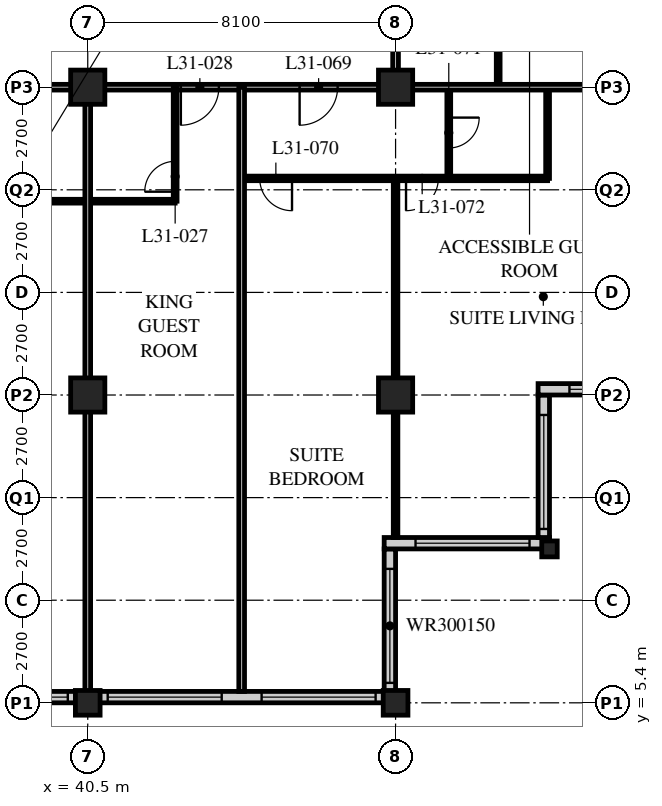
"""IFC4 building model, lengths in metres.
Left out: names, types, materials, properties, quantities, classifications, styles, units other than length and angle.
Written with IfcOpenShell. Run it as: python <this file> out.ifc"""

import sys

from ifc_helpers import new_model, si_unit, direction, frame, frame_2d, origin, origin_2d, place, context, subcontext, project, spatial, rectangle, hollow_rectangle, i_section, extrude, element, fill, save


model = new_model("IFC4")
c1 = context("Model", 3, precision=1e-05, world=origin(), true_north=direction((0.0, 1.0)))
c2 = subcontext(c1, "Body", "Model", "MODEL_VIEW")
j1 = project(units=[si_unit("LENGTHUNIT", "METRE"), si_unit("PLANEANGLEUNIT", "RADIAN")], contexts=[c1])
p1 = place(None, origin())
s1 = spatial("IfcSite", under=j1, at=p1, CompositionType="ELEMENT")
p2 = place(p1, origin())
s2 = spatial("IfcBuilding", under=s1, at=p2, CompositionType="ELEMENT")
p3 = place(p2, frame((0.0, 0.0, 123.8)))
s3 = spatial("IfcBuildingStorey", under=s2, at=p3, CompositionType="ELEMENT", Elevation=123.8)
p4 = place(p3, frame((40.5, 5.4, 0.0), z_axis=(0.0, 0.0, 1.0), x_axis=(1.0, 0.0, 0.0)))
e1 = element("IfcColumn", 1, at=p4, inside=s3, PredefinedType="COLUMN", context=c2, shape_type="SweptSolid", body=[
    extrude(hollow_rectangle(XDim=0.65, YDim=0.65, WallThickness=0.055, at=origin_2d()), origin(), (0.0, 0.0, 1.0), 3.4),
])
for number, where, z_axis, x_axis in (
    (2, (40.5, 13.5, 0.0), (0.0, 0.0, 1.0), (1.0, 0.0, 0.0)),
    (3, (40.5, 21.6, 0.0), (0.0, 0.0, 1.0), (1.0, 0.0, 0.0)),
):
    element("IfcColumn", number, at=place(p3, frame(where, z_axis=z_axis, x_axis=x_axis)), inside=s3, PredefinedType="COLUMN", context=c2, shape_type="SweptSolid", body=[
        extrude(hollow_rectangle(XDim=0.9, YDim=0.9, WallThickness=0.09, at=origin_2d()), origin(), (0.0, 0.0, 1.0), 3.4),
    ])
p5 = place(p3, frame((48.6, 5.4, 0.0), z_axis=(0.0, 0.0, 1.0), x_axis=(1.0, 0.0, 0.0)))
e4 = element("IfcColumn", 4, at=p5, inside=s3, PredefinedType="COLUMN", context=c2, shape_type="SweptSolid", body=[
    extrude(hollow_rectangle(XDim=0.65, YDim=0.65, WallThickness=0.055, at=origin_2d()), origin(), (0.0, 0.0, 1.0), 3.4),
])
for number, where, z_axis, x_axis in (
    (5, (48.6, 13.5, 0.0), (0.0, 0.0, 1.0), (1.0, 0.0, 0.0)),
    (6, (48.6, 21.6, 0.0), (0.0, 0.0, 1.0), (1.0, 0.0, 0.0)),
):
    element("IfcColumn", number, at=place(p3, frame(where, z_axis=z_axis, x_axis=x_axis)), inside=s3, PredefinedType="COLUMN", context=c2, shape_type="SweptSolid", body=[
        extrude(hollow_rectangle(XDim=0.9, YDim=0.9, WallThickness=0.09, at=origin_2d()), origin(), (0.0, 0.0, 1.0), 3.4),
    ])
p6 = place(p3, frame((52.65, 9.45, 0.0), z_axis=(0.0, 0.0, 1.0), x_axis=(1.0, 0.0, 0.0)))
e7 = element("IfcColumn", 7, at=p6, inside=s3, PredefinedType="COLUMN", context=c2, shape_type="SweptSolid", body=[
    extrude(i_section(OverallWidth=0.407, OverallDepth=0.419, WebThickness=0.031, FlangeThickness=0.049, FilletRadius=0.015, at=origin_2d()), origin(), (0.0, 0.0, 1.0), 3.4),
])
p7 = place(p3, frame((8.4, 5.55, 0.0), z_axis=(0.0, 0.0, 1.0), x_axis=(1.0, 0.0, 0.0)))
e8 = element("IfcWall", 8, at=p7, inside=s3, PredefinedType="SOLIDWALL", context=c2, shape_type="SweptSolid", body=[
    extrude(rectangle(XDim=40.2, YDim=0.3, at=frame_2d((20.1, 0.0))), origin(), (0.0, 0.0, 1.0), 3.19),
])
p8 = place(p7, frame((0.225, 0.0, 0.9)))
e9 = element("IfcOpeningElement", 9, at=p8, cuts=e8, PredefinedType="OPENING", context=c2, shape_type="SweptSolid", body=[
    extrude(rectangle(XDim=3.0, YDim=2.0, at=frame_2d((1.5, 1.0))), frame((0.0, 0.16, 0.0), z_axis=(0.0, -1.0, 0.0), x_axis=(1.0, 0.0, 0.0)), (0.0, 0.0, 1.0), 0.32),
])
p9 = place(p7, frame((4.275, 0.0, 0.9)))
e10 = element("IfcOpeningElement", 10, at=p9, cuts=e8, PredefinedType="OPENING", context=c2, shape_type="SweptSolid", body=[
    extrude(rectangle(XDim=3.0, YDim=2.0, at=frame_2d((1.5, 1.0))), frame((0.0, 0.16, 0.0), z_axis=(0.0, -1.0, 0.0), x_axis=(1.0, 0.0, 0.0)), (0.0, 0.0, 1.0), 0.32),
])
p10 = place(p7, frame((8.325, 0.0, 0.9)))
e11 = element("IfcOpeningElement", 11, at=p10, cuts=e8, PredefinedType="OPENING", context=c2, shape_type="SweptSolid", body=[
    extrude(rectangle(XDim=3.0, YDim=2.0, at=frame_2d((1.5, 1.0))), frame((0.0, 0.16, 0.0), z_axis=(0.0, -1.0, 0.0), x_axis=(1.0, 0.0, 0.0)), (0.0, 0.0, 1.0), 0.32),
])
p11 = place(p7, frame((12.375, 0.0, 0.9)))
e12 = element("IfcOpeningElement", 12, at=p11, cuts=e8, PredefinedType="OPENING", context=c2, shape_type="SweptSolid", body=[
    extrude(rectangle(XDim=3.0, YDim=2.0, at=frame_2d((1.5, 1.0))), frame((0.0, 0.16, 0.0), z_axis=(0.0, -1.0, 0.0), x_axis=(1.0, 0.0, 0.0)), (0.0, 0.0, 1.0), 0.32),
])
p12 = place(p7, frame((16.425, 0.0, 0.9)))
e13 = element("IfcOpeningElement", 13, at=p12, cuts=e8, PredefinedType="OPENING", context=c2, shape_type="SweptSolid", body=[
    extrude(rectangle(XDim=3.0, YDim=2.0, at=frame_2d((1.5, 1.0))), frame((0.0, 0.16, 0.0), z_axis=(0.0, -1.0, 0.0), x_axis=(1.0, 0.0, 0.0)), (0.0, 0.0, 1.0), 0.32),
])
p13 = place(p7, frame((20.475, 0.0, 0.9)))
e14 = element("IfcOpeningElement", 14, at=p13, cuts=e8, PredefinedType="OPENING", context=c2, shape_type="SweptSolid", body=[
    extrude(rectangle(XDim=3.0, YDim=2.0, at=frame_2d((1.5, 1.0))), frame((0.0, 0.16, 0.0), z_axis=(0.0, -1.0, 0.0), x_axis=(1.0, 0.0, 0.0)), (0.0, 0.0, 1.0), 0.32),
])
p14 = place(p7, frame((24.525, 0.0, 0.9)))
e15 = element("IfcOpeningElement", 15, at=p14, cuts=e8, PredefinedType="OPENING", context=c2, shape_type="SweptSolid", body=[
    extrude(rectangle(XDim=3.0, YDim=2.0, at=frame_2d((1.5, 1.0))), frame((0.0, 0.16, 0.0), z_axis=(0.0, -1.0, 0.0), x_axis=(1.0, 0.0, 0.0)), (0.0, 0.0, 1.0), 0.32),
])
p15 = place(p7, frame((28.575, 0.0, 0.9)))
e16 = element("IfcOpeningElement", 16, at=p15, cuts=e8, PredefinedType="OPENING", context=c2, shape_type="SweptSolid", body=[
    extrude(rectangle(XDim=3.0, YDim=2.0, at=frame_2d((1.5, 1.0))), frame((0.0, 0.16, 0.0), z_axis=(0.0, -1.0, 0.0), x_axis=(1.0, 0.0, 0.0)), (0.0, 0.0, 1.0), 0.32),
])
p16 = place(p7, frame((32.625, 0.0, 0.9)))
e17 = element("IfcOpeningElement", 17, at=p16, cuts=e8, PredefinedType="OPENING", context=c2, shape_type="SweptSolid", body=[
    extrude(rectangle(XDim=3.0, YDim=2.0, at=frame_2d((1.5, 1.0))), frame((0.0, 0.16, 0.0), z_axis=(0.0, -1.0, 0.0), x_axis=(1.0, 0.0, 0.0)), (0.0, 0.0, 1.0), 0.32),
])
p17 = place(p7, frame((36.675, 0.0, 0.9)))
e18 = element("IfcOpeningElement", 18, at=p17, cuts=e8, PredefinedType="OPENING", context=c2, shape_type="SweptSolid", body=[
    extrude(rectangle(XDim=3.0, YDim=2.0, at=frame_2d((1.5, 1.0))), frame((0.0, 0.16, 0.0), z_axis=(0.0, -1.0, 0.0), x_axis=(1.0, 0.0, 0.0)), (0.0, 0.0, 1.0), 0.32),
])
p18 = place(p3, frame((48.45, 5.7, 0.0), z_axis=(0.0, 0.0, 1.0), x_axis=(0.0, 1.0, 0.0)))
e19 = element("IfcWall", 19, at=p18, inside=s3, PredefinedType="SOLIDWALL", context=c2, shape_type="SweptSolid", body=[
    extrude(rectangle(XDim=3.75, YDim=0.3, at=frame_2d((1.875, 0.0))), origin(), (0.0, 0.0, 1.0), 3.19),
])
p19 = place(p18, frame((0.225, 0.0, 0.9)))
e20 = element("IfcOpeningElement", 20, at=p19, cuts=e19, PredefinedType="OPENING", context=c2, shape_type="SweptSolid", body=[
    extrude(rectangle(XDim=3.0, YDim=1.5, at=frame_2d((1.5, 0.75))), frame((0.0, 0.16, 0.0), z_axis=(0.0, -1.0, 0.0), x_axis=(1.0, 0.0, 0.0)), (0.0, 0.0, 1.0), 0.32),
])
p20 = place(p3, frame((48.3, 9.6, 0.0), z_axis=(0.0, 0.0, 1.0), x_axis=(1.0, 0.0, 0.0)))
e21 = element("IfcWall", 21, at=p20, inside=s3, PredefinedType="SOLIDWALL", context=c2, shape_type="SweptSolid", body=[
    extrude(rectangle(XDim=4.35, YDim=0.3, at=frame_2d((2.175, 0.0))), origin(), (0.0, 0.0, 1.0), 3.19),
])
p21 = place(p20, frame((0.825, 0.0, 0.9)))
e22 = element("IfcOpeningElement", 22, at=p21, cuts=e21, PredefinedType="OPENING", context=c2, shape_type="SweptSolid", body=[
    extrude(rectangle(XDim=3.0, YDim=1.5, at=frame_2d((1.5, 0.75))), frame((0.0, 0.16, 0.0), z_axis=(0.0, -1.0, 0.0), x_axis=(1.0, 0.0, 0.0)), (0.0, 0.0, 1.0), 0.32),
])
p22 = place(p3, frame((52.5, 9.75, 0.0), z_axis=(0.0, 0.0, 1.0), x_axis=(0.0, 1.0, 0.0)))
e23 = element("IfcWall", 23, at=p22, inside=s3, PredefinedType="SOLIDWALL", context=c2, shape_type="SweptSolid", body=[
    extrude(rectangle(XDim=3.75, YDim=0.3, at=frame_2d((1.875, 0.0))), origin(), (0.0, 0.0, 1.0), 3.19),
])
p23 = place(p22, frame((0.225, 0.0, 0.9)))
e24 = element("IfcOpeningElement", 24, at=p23, cuts=e23, PredefinedType="OPENING", context=c2, shape_type="SweptSolid", body=[
    extrude(rectangle(XDim=3.0, YDim=1.5, at=frame_2d((1.5, 0.75))), frame((0.0, 0.16, 0.0), z_axis=(0.0, -1.0, 0.0), x_axis=(1.0, 0.0, 0.0)), (0.0, 0.0, 1.0), 0.32),
])
p24 = place(p3, frame((52.35, 13.65, 0.0), z_axis=(0.0, 0.0, 1.0), x_axis=(1.0, 0.0, 0.0)))
e25 = element("IfcWall", 25, at=p24, inside=s3, PredefinedType="SOLIDWALL", context=c2, shape_type="SweptSolid", body=[
    extrude(rectangle(XDim=4.35, YDim=0.3, at=frame_2d((2.175, 0.0))), origin(), (0.0, 0.0, 1.0), 3.19),
])
p25 = place(p24, frame((0.825, 0.0, 0.9)))
e26 = element("IfcOpeningElement", 26, at=p25, cuts=e25, PredefinedType="OPENING", context=c2, shape_type="SweptSolid", body=[
    extrude(rectangle(XDim=3.0, YDim=1.5, at=frame_2d((1.5, 0.75))), frame((0.0, 0.16, 0.0), z_axis=(0.0, -1.0, 0.0), x_axis=(1.0, 0.0, 0.0)), (0.0, 0.0, 1.0), 0.32),
])
p26 = place(p3, frame((8.1, 21.6, 0.0), z_axis=(0.0, 0.0, 1.0), x_axis=(1.0, 0.0, 0.0)))
e27 = element("IfcWall", 27, at=p26, inside=s3, PredefinedType="PARTITIONING", context=c2, shape_type="SweptSolid", body=[
    extrude(rectangle(XDim=40.5, YDim=0.15, at=frame_2d((20.25, 0.0))), origin(), (0.0, 0.0, 1.0), 2.578),
])
p27 = place(p26, frame((9.625, 0.0, 0.0)))
e28 = element("IfcOpeningElement", 28, at=p27, cuts=e27, PredefinedType="OPENING", context=c2, shape_type="SweptSolid", body=[
    extrude(rectangle(XDim=1.0, YDim=2.1, at=frame_2d((0.5, 1.05))), frame((0.0, 0.085, 0.0), z_axis=(0.0, -1.0, 0.0), x_axis=(1.0, 0.0, 0.0)), (0.0, 0.0, 1.0), 0.17),
])
p28 = place(p26, frame((21.775, 0.0, 0.0)))
e29 = element("IfcOpeningElement", 29, at=p28, cuts=e27, PredefinedType="OPENING", context=c2, shape_type="SweptSolid", body=[
    extrude(rectangle(XDim=1.0, YDim=2.1, at=frame_2d((0.5, 1.05))), frame((0.0, 0.085, 0.0), z_axis=(0.0, -1.0, 0.0), x_axis=(1.0, 0.0, 0.0)), (0.0, 0.0, 1.0), 0.17),
])
p29 = place(p26, frame((28.95, 0.0, 0.0)))
e30 = element("IfcOpeningElement", 30, at=p29, cuts=e27, PredefinedType="OPENING", context=c2, shape_type="SweptSolid", body=[
    extrude(rectangle(XDim=1.0, YDim=2.1, at=frame_2d((0.5, 1.05))), frame((0.0, 0.085, 0.0), z_axis=(0.0, -1.0, 0.0), x_axis=(1.0, 0.0, 0.0)), (0.0, 0.0, 1.0), 0.17),
])
p30 = place(p26, frame((34.85, 0.0, 0.0)))
e31 = element("IfcOpeningElement", 31, at=p30, cuts=e27, PredefinedType="OPENING", context=c2, shape_type="SweptSolid", body=[
    extrude(rectangle(XDim=1.0, YDim=2.1, at=frame_2d((0.5, 1.05))), frame((0.0, 0.085, 0.0), z_axis=(0.0, -1.0, 0.0), x_axis=(1.0, 0.0, 0.0)), (0.0, 0.0, 1.0), 0.17),
])
p31 = place(p26, frame((1.525, 0.0, 0.0)))
e32 = element("IfcOpeningElement", 32, at=p31, cuts=e27, PredefinedType="OPENING", context=c2, shape_type="SweptSolid", body=[
    extrude(rectangle(XDim=1.0, YDim=2.1, at=frame_2d((0.5, 1.05))), frame((0.0, 0.085, 0.0), z_axis=(0.0, -1.0, 0.0), x_axis=(1.0, 0.0, 0.0)), (0.0, 0.0, 1.0), 0.17),
])
p32 = place(p26, frame((37.975, 0.0, 0.0)))
e33 = element("IfcOpeningElement", 33, at=p32, cuts=e27, PredefinedType="OPENING", context=c2, shape_type="SweptSolid", body=[
    extrude(rectangle(XDim=1.0, YDim=2.1, at=frame_2d((0.5, 1.05))), frame((0.0, 0.085, 0.0), z_axis=(0.0, -1.0, 0.0), x_axis=(1.0, 0.0, 0.0)), (0.0, 0.0, 1.0), 0.17),
])
p33 = place(p3, frame((48.6, 21.6, 0.0), z_axis=(0.0, 0.0, 1.0), x_axis=(0.0, 1.0, 0.0)))
e34 = element("IfcWall", 34, at=p33, inside=s3, PredefinedType="PARTITIONING", context=c2, shape_type="SweptSolid", body=[
    extrude(rectangle(XDim=24.3, YDim=0.15, at=frame_2d((12.15, 0.0))), origin(), (0.0, 0.0, 1.0), 2.578),
])
p34 = place(p33, frame((2.75, 0.0, 0.0)))
e35 = element("IfcOpeningElement", 35, at=p34, cuts=e34, PredefinedType="OPENING", context=c2, shape_type="SweptSolid", body=[
    extrude(rectangle(XDim=1.0, YDim=2.1, at=frame_2d((0.5, 1.05))), frame((0.0, 0.085, 0.0), z_axis=(0.0, -1.0, 0.0), x_axis=(1.0, 0.0, 0.0)), (0.0, 0.0, 1.0), 0.17),
])
p35 = place(p33, frame((4.65, 0.0, 0.0)))
e36 = element("IfcOpeningElement", 36, at=p35, cuts=e34, PredefinedType="OPENING", context=c2, shape_type="SweptSolid", body=[
    extrude(rectangle(XDim=1.0, YDim=2.1, at=frame_2d((0.5, 1.05))), frame((0.0, 0.085, 0.0), z_axis=(0.0, -1.0, 0.0), x_axis=(1.0, 0.0, 0.0)), (0.0, 0.0, 1.0), 0.17),
])
p36 = place(p33, frame((10.0, 0.0, 0.0)))
e37 = element("IfcOpeningElement", 37, at=p36, cuts=e34, PredefinedType="OPENING", context=c2, shape_type="SweptSolid", body=[
    extrude(rectangle(XDim=1.0, YDim=2.1, at=frame_2d((0.5, 1.05))), frame((0.0, 0.085, 0.0), z_axis=(0.0, -1.0, 0.0), x_axis=(1.0, 0.0, 0.0)), (0.0, 0.0, 1.0), 0.17),
])
p37 = place(p33, frame((18.1, 0.0, 0.0)))
e38 = element("IfcOpeningElement", 38, at=p37, cuts=e34, PredefinedType="OPENING", context=c2, shape_type="SweptSolid", body=[
    extrude(rectangle(XDim=1.0, YDim=2.1, at=frame_2d((0.5, 1.05))), frame((0.0, 0.085, 0.0), z_axis=(0.0, -1.0, 0.0), x_axis=(1.0, 0.0, 0.0)), (0.0, 0.0, 1.0), 0.17),
])
p38 = place(p3, frame((38.2, 18.6, 0.0), z_axis=(0.0, 0.0, 1.0), x_axis=(1.0, 0.0, 0.0)))
e39 = element("IfcWall", 39, at=p38, inside=s3, PredefinedType="PARTITIONING", context=c2, shape_type="SweptSolid", body=[
    extrude(rectangle(XDim=4.6, YDim=0.1, at=frame_2d((2.3, 0.0))), origin(), (0.0, 0.0, 1.0), 3.19),
])
p39 = place(p3, frame((40.5, 21.6, 0.0), z_axis=(0.0, 0.0, 1.0), x_axis=(0.0, -1.0, 0.0)))
e40 = element("IfcWall", 40, at=p39, inside=s3, PredefinedType="PARTITIONING", context=c2, shape_type="SweptSolid", body=[
    extrude(rectangle(XDim=15.9, YDim=0.15, at=frame_2d((7.95, 0.0))), origin(), (0.0, 0.0, 1.0), 2.578),
])
p40 = place(p3, frame((42.8, 21.6, 0.0), z_axis=(0.0, 0.0, 1.0), x_axis=(0.0, -1.0, 0.0)))
e41 = element("IfcWall", 41, at=p40, inside=s3, PredefinedType="PARTITIONING", context=c2, shape_type="SweptSolid", body=[
    extrude(rectangle(XDim=3.0, YDim=0.1, at=frame_2d((1.5, 0.0))), origin(), (0.0, 0.0, 1.0), 3.19),
])
p41 = place(p40, frame((1.95, 0.0, 0.0)))
e42 = element("IfcOpeningElement", 42, at=p41, cuts=e41, PredefinedType="OPENING", context=c2, shape_type="SweptSolid", body=[
    extrude(rectangle(XDim=0.8, YDim=2.1, at=frame_2d((0.4, 1.05))), frame((0.0, 0.06, 0.0), z_axis=(0.0, -1.0, 0.0), x_axis=(1.0, 0.0, 0.0)), (0.0, 0.0, 1.0), 0.12),
])
p42 = place(p3, frame((51.3, 21.6, 0.0), z_axis=(0.0, 0.0, 1.0), x_axis=(0.0, 1.0, 0.0)))
e43 = element("IfcWall", 43, at=p42, inside=s3, PredefinedType="PARTITIONING", context=c2, shape_type="SweptSolid", body=[
    extrude(rectangle(XDim=2.6, YDim=0.1, at=frame_2d((1.3, 0.0))), origin(), (0.0, 0.0, 1.0), 3.19),
])
p43 = place(p3, frame((44.55, 19.2, 0.0), z_axis=(0.0, 0.0, 1.0), x_axis=(1.0, 0.0, 0.0)))
e44 = element("IfcWall", 44, at=p43, inside=s3, PredefinedType="PARTITIONING", context=c2, shape_type="SweptSolid", body=[
    extrude(rectangle(XDim=8.05, YDim=0.12, at=frame_2d((4.025, 0.0))), origin(), (0.0, 0.0, 1.0), 3.19),
])
p44 = place(p43, frame((0.475, 0.0, 0.0)))
e45 = element("IfcOpeningElement", 45, at=p44, cuts=e44, PredefinedType="OPENING", context=c2, shape_type="SweptSolid", body=[
    extrude(rectangle(XDim=0.85, YDim=2.1, at=frame_2d((0.425, 1.05))), frame((0.0, 0.07, 0.0), z_axis=(0.0, -1.0, 0.0), x_axis=(1.0, 0.0, 0.0)), (0.0, 0.0, 1.0), 0.14),
])
p45 = place(p43, frame((4.325, 0.0, 0.0)))
e46 = element("IfcOpeningElement", 46, at=p45, cuts=e44, PredefinedType="OPENING", context=c2, shape_type="SweptSolid", body=[
    extrude(rectangle(XDim=0.85, YDim=2.1, at=frame_2d((0.425, 1.05))), frame((0.0, 0.07, 0.0), z_axis=(0.0, -1.0, 0.0), x_axis=(1.0, 0.0, 0.0)), (0.0, 0.0, 1.0), 0.14),
])
p46 = place(p3, frame((50.0, 21.6, 0.0), z_axis=(0.0, 0.0, 1.0), x_axis=(0.0, -1.0, 0.0)))
e47 = element("IfcWall", 47, at=p46, inside=s3, PredefinedType="PARTITIONING", context=c2, shape_type="SweptSolid", body=[
    extrude(rectangle(XDim=2.4, YDim=0.1, at=frame_2d((1.2, 0.0))), origin(), (0.0, 0.0, 1.0), 3.19),
])
p47 = place(p46, frame((0.8, 0.0, 0.0)))
e48 = element("IfcOpeningElement", 48, at=p47, cuts=e47, PredefinedType="OPENING", context=c2, shape_type="SweptSolid", body=[
    extrude(rectangle(XDim=0.8, YDim=2.1, at=frame_2d((0.4, 1.05))), frame((0.0, 0.06, 0.0), z_axis=(0.0, -1.0, 0.0), x_axis=(1.0, 0.0, 0.0)), (0.0, 0.0, 1.0), 0.12),
])
p48 = place(p3, frame((52.6, 21.6, 0.0), z_axis=(0.0, 0.0, 1.0), x_axis=(0.0, -1.0, 0.0)))
e49 = element("IfcWall", 49, at=p48, inside=s3, PredefinedType="PARTITIONING", context=c2, shape_type="SweptSolid", body=[
    extrude(rectangle(XDim=2.4, YDim=0.1, at=frame_2d((1.2, 0.0))), origin(), (0.0, 0.0, 1.0), 3.19),
])
p49 = place(p3, frame((48.6, 19.2, 0.0), z_axis=(0.0, 0.0, 1.0), x_axis=(0.0, -1.0, 0.0)))
e50 = element("IfcWall", 50, at=p49, inside=s3, PredefinedType="PARTITIONING", context=c2, shape_type="SweptSolid", body=[
    extrude(rectangle(XDim=9.45, YDim=0.12, at=frame_2d((4.725, 0.0))), origin(), (0.0, 0.0, 1.0), 2.578),
])
p50 = place(p3, frame((48.6, 21.6, 0.0), z_axis=(0.0, 0.0, 1.0), x_axis=(1.0, 0.0, 0.0)))
e51 = element("IfcWall", 51, at=p50, inside=s3, PredefinedType="PARTITIONING", context=c2, shape_type="SweptSolid", body=[
    extrude(rectangle(XDim=7.8, YDim=0.15, at=frame_2d((3.9, 0.0))), origin(), (0.0, 0.0, 1.0), 2.578),
])
p51 = place(p3, frame((44.55, 21.6, 0.0), z_axis=(0.0, 0.0, 1.0), x_axis=(0.0, -1.0, 0.0)))
e52 = element("IfcWall", 52, at=p51, inside=s3, PredefinedType="PARTITIONING", context=c2, shape_type="SweptSolid", body=[
    extrude(rectangle(XDim=15.9, YDim=0.15, at=frame_2d((7.95, 0.0))), origin(), (0.0, 0.0, 1.0), 3.19),
])
p52 = place(p15, origin())
e53 = element("IfcWindow", 53, at=p52, inside=s3, PartitioningType="SINGLE_PANEL", PredefinedType="WINDOW", context=c2, shape_type="SweptSolid", body=[
    extrude(rectangle(XDim=3.0, YDim=2.0, at=frame_2d((1.5, 1.0))), frame((0.0, 0.03, 0.0), z_axis=(0.0, -1.0, 0.0), x_axis=(1.0, 0.0, 0.0)), (0.0, 0.0, 1.0), 0.06),
])
fill(e16, e53)
p53 = place(p16, origin())
e54 = element("IfcWindow", 54, at=p53, inside=s3, PartitioningType="SINGLE_PANEL", PredefinedType="WINDOW", context=c2, shape_type="SweptSolid", body=[
    extrude(rectangle(XDim=3.0, YDim=2.0, at=frame_2d((1.5, 1.0))), frame((0.0, 0.03, 0.0), z_axis=(0.0, -1.0, 0.0), x_axis=(1.0, 0.0, 0.0)), (0.0, 0.0, 1.0), 0.06),
])
fill(e17, e54)
p54 = place(p17, origin())
e55 = element("IfcWindow", 55, at=p54, inside=s3, PartitioningType="SINGLE_PANEL", PredefinedType="WINDOW", context=c2, shape_type="SweptSolid", body=[
    extrude(rectangle(XDim=3.0, YDim=2.0, at=frame_2d((1.5, 1.0))), frame((0.0, 0.03, 0.0), z_axis=(0.0, -1.0, 0.0), x_axis=(1.0, 0.0, 0.0)), (0.0, 0.0, 1.0), 0.06),
])
fill(e18, e55)
p55 = place(p19, origin())
e56 = element("IfcWindow", 56, at=p55, inside=s3, PartitioningType="SINGLE_PANEL", PredefinedType="WINDOW", context=c2, shape_type="SweptSolid", body=[
    extrude(rectangle(XDim=3.0, YDim=1.5, at=frame_2d((1.5, 0.75))), frame((0.0, 0.03, 0.0), z_axis=(0.0, -1.0, 0.0), x_axis=(1.0, 0.0, 0.0)), (0.0, 0.0, 1.0), 0.06),
])
fill(e20, e56)
p56 = place(p21, origin())
e57 = element("IfcWindow", 57, at=p56, inside=s3, PartitioningType="SINGLE_PANEL", PredefinedType="WINDOW", context=c2, shape_type="SweptSolid", body=[
    extrude(rectangle(XDim=3.0, YDim=1.5, at=frame_2d((1.5, 0.75))), frame((0.0, 0.03, 0.0), z_axis=(0.0, -1.0, 0.0), x_axis=(1.0, 0.0, 0.0)), (0.0, 0.0, 1.0), 0.06),
])
fill(e22, e57)
p57 = place(p23, origin())
e58 = element("IfcWindow", 58, at=p57, inside=s3, PartitioningType="SINGLE_PANEL", PredefinedType="WINDOW", context=c2, shape_type="SweptSolid", body=[
    extrude(rectangle(XDim=3.0, YDim=1.5, at=frame_2d((1.5, 0.75))), frame((0.0, 0.03, 0.0), z_axis=(0.0, -1.0, 0.0), x_axis=(1.0, 0.0, 0.0)), (0.0, 0.0, 1.0), 0.06),
])
fill(e24, e58)
p58 = place(p25, origin())
e59 = element("IfcWindow", 59, at=p58, inside=s3, PartitioningType="SINGLE_PANEL", PredefinedType="WINDOW", context=c2, shape_type="SweptSolid", body=[
    extrude(rectangle(XDim=3.0, YDim=1.5, at=frame_2d((1.5, 0.75))), frame((0.0, 0.03, 0.0), z_axis=(0.0, -1.0, 0.0), x_axis=(1.0, 0.0, 0.0)), (0.0, 0.0, 1.0), 0.06),
])
fill(e26, e59)
p59 = place(p41, origin())
e60 = element("IfcDoor", 60, at=p59, inside=s3, OperationType="SINGLE_SWING_LEFT", PredefinedType="DOOR", context=c2, shape_type="SweptSolid", body=[
    extrude(rectangle(XDim=0.8, YDim=2.1, at=frame_2d((0.4, 1.05))), frame((0.0, 0.025, 0.0), z_axis=(0.0, -1.0, 0.0), x_axis=(1.0, 0.0, 0.0)), (0.0, 0.0, 1.0), 0.05),
])
fill(e42, e60)
p60 = place(p30, origin())
e61 = element("IfcDoor", 61, at=p60, inside=s3, OperationType="SINGLE_SWING_RIGHT", PredefinedType="DOOR", context=c2, shape_type="SweptSolid", body=[
    extrude(rectangle(XDim=1.0, YDim=2.1, at=frame_2d((0.5, 1.05))), frame((0.0, 0.025, 0.0), z_axis=(0.0, -1.0, 0.0), x_axis=(1.0, 0.0, 0.0)), (0.0, 0.0, 1.0), 0.05),
])
fill(e31, e61)
p61 = place(p32, origin())
e62 = element("IfcDoor", 62, at=p61, inside=s3, OperationType="SINGLE_SWING_RIGHT", PredefinedType="DOOR", context=c2, shape_type="SweptSolid", body=[
    extrude(rectangle(XDim=1.0, YDim=2.1, at=frame_2d((0.5, 1.05))), frame((0.0, 0.025, 0.0), z_axis=(0.0, -1.0, 0.0), x_axis=(1.0, 0.0, 0.0)), (0.0, 0.0, 1.0), 0.05),
])
fill(e33, e62)
p62 = place(p44, origin())
e63 = element("IfcDoor", 63, at=p62, inside=s3, OperationType="SINGLE_SWING_LEFT", PredefinedType="DOOR", context=c2, shape_type="SweptSolid", body=[
    extrude(rectangle(XDim=0.85, YDim=2.1, at=frame_2d((0.425, 1.05))), frame((0.0, 0.025, 0.0), z_axis=(0.0, -1.0, 0.0), x_axis=(1.0, 0.0, 0.0)), (0.0, 0.0, 1.0), 0.05),
])
fill(e45, e63)
p63 = place(p47, origin())
e64 = element("IfcDoor", 64, at=p63, inside=s3, OperationType="SINGLE_SWING_LEFT", PredefinedType="DOOR", context=c2, shape_type="SweptSolid", body=[
    extrude(rectangle(XDim=0.8, YDim=2.1, at=frame_2d((0.4, 1.05))), frame((0.0, 0.025, 0.0), z_axis=(0.0, -1.0, 0.0), x_axis=(1.0, 0.0, 0.0)), (0.0, 0.0, 1.0), 0.05),
])
fill(e48, e64)
p64 = place(p45, origin())
e65 = element("IfcDoor", 65, at=p64, inside=s3, OperationType="SINGLE_SWING_RIGHT", PredefinedType="DOOR", context=c2, shape_type="SweptSolid", body=[
    extrude(rectangle(XDim=0.85, YDim=2.1, at=frame_2d((0.425, 1.05))), frame((0.0, 0.025, 0.0), z_axis=(0.0, -1.0, 0.0), x_axis=(1.0, 0.0, 0.0)), (0.0, 0.0, 1.0), 0.05),
])
fill(e46, e65)
save(model, sys.argv[1])
